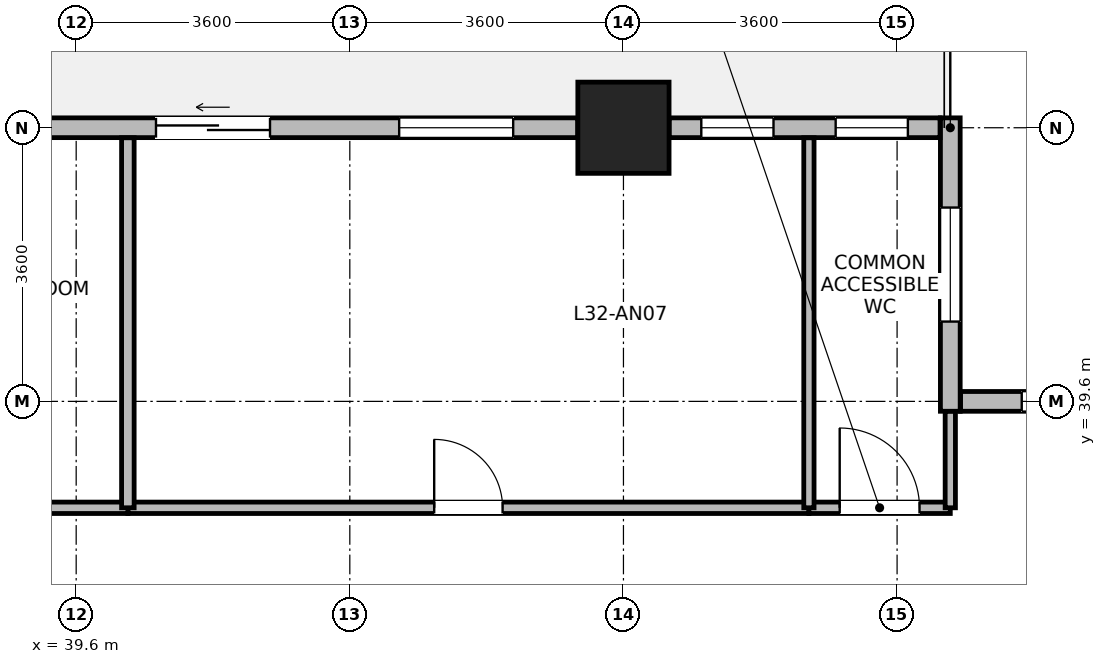
"""IFC4 building model, lengths in metres.
Left out: names, types, materials, properties, quantities, classifications, styles, units other than length and angle.
Written with IfcOpenShell. Run it as: python <this file> out.ifc"""

import sys

from ifc_helpers import new_model, si_unit, direction, frame, frame_2d, origin, origin_2d, place, context, subcontext, project, spatial, rectangle, extrude, source, transform, mapped, element, fill, save


model = new_model("IFC4")
c1 = context("Model", 3, precision=1e-05, world=origin(), true_north=direction((0.0, 1.0)))
c2 = subcontext(c1, "Body", "Model", "MODEL_VIEW")
j1 = project(units=[si_unit("LENGTHUNIT", "METRE"), si_unit("PLANEANGLEUNIT", "RADIAN")], contexts=[c1])
p1 = place(None, origin())
s1 = spatial("IfcSite", under=j1, at=p1, CompositionType="ELEMENT")
p2 = place(p1, origin())
s2 = spatial("IfcBuilding", under=s1, at=p2, CompositionType="ELEMENT")
p3 = place(p2, frame((0.0, 0.0, 126.7)))
s3 = spatial("IfcBuildingStorey", under=s2, at=p3, CompositionType="ELEMENT", Elevation=126.7)
m1 = source(origin(), c2, "Body", "SweptSolid", [
    extrude(rectangle(XDim=1.2, YDim=1.2, at=origin_2d()), origin(), (0.0, 0.0, 1.0), 3.7),
])
p4 = place(p3, frame((46.8, 43.2, 0.0), z_axis=(0.0, 0.0, 1.0), x_axis=(1.0, 0.0, 0.0)))
e1 = element("IfcColumn", 1, at=p4, inside=s3, PredefinedType="COLUMN", context=c2, shape_type="MappedRepresentation", body=[
    mapped(m1, transform((0.0, 0.0, 0.0), x_axis=(1.0, 0.0, 0.0), y_axis=(0.0, 1.0, 0.0), z_axis=(0.0, 0.0, 1.0), scale=1.0)),
])
p5 = place(p3, frame((51.235, 39.6, 0.0), z_axis=(0.0, 0.0, 1.0), x_axis=(1.0, 0.0, 0.0)))
e2 = element("IfcWall", 2, at=p5, inside=s3, PredefinedType="STANDARD", context=c2, shape_type="SweptSolid", body=[
    extrude(rectangle(XDim=9.33, YDim=0.26, at=frame_2d((4.665, 0.0))), origin(), (0.0, 0.0, 1.0), 3.32),
])
p6 = place(p5, frame((0.805, 0.0, 0.85)))
e3 = element("IfcOpeningElement", 3, at=p6, cuts=e2, PredefinedType="OPENING", context=c2, shape_type="SweptSolid", body=[
    extrude(rectangle(XDim=1.5, YDim=1.85, at=frame_2d((0.75, 0.925))), frame((0.0, 0.14, 0.0), z_axis=(0.0, -1.0, 0.0), x_axis=(1.0, 0.0, 0.0)), (0.0, 0.0, 1.0), 0.28),
])
p7 = place(p5, frame((3.915, 0.0, 0.85)))
e4 = element("IfcOpeningElement", 4, at=p7, cuts=e2, PredefinedType="OPENING", context=c2, shape_type="SweptSolid", body=[
    extrude(rectangle(XDim=1.5, YDim=1.85, at=frame_2d((0.75, 0.925))), frame((0.0, 0.14, 0.0), z_axis=(0.0, -1.0, 0.0), x_axis=(1.0, 0.0, 0.0)), (0.0, 0.0, 1.0), 0.28),
])
p8 = place(p5, frame((7.025, 0.0, 0.85)))
e5 = element("IfcOpeningElement", 5, at=p8, cuts=e2, PredefinedType="OPENING", context=c2, shape_type="SweptSolid", body=[
    extrude(rectangle(XDim=1.5, YDim=1.85, at=frame_2d((0.75, 0.925))), frame((0.0, 0.14, 0.0), z_axis=(0.0, -1.0, 0.0), x_axis=(1.0, 0.0, 0.0)), (0.0, 0.0, 1.0), 0.28),
])
p9 = place(p3, frame((51.1, 43.33, 0.0), z_axis=(0.0, 0.0, 1.0), x_axis=(0.0, -1.0, 0.0)))
e6 = element("IfcWall", 6, at=p9, inside=s3, PredefinedType="STANDARD", context=c2, shape_type="SweptSolid", body=[
    extrude(rectangle(XDim=3.86, YDim=0.26, at=frame_2d((1.93, 0.0))), origin(), (0.0, 0.0, 1.0), 3.32),
])
p10 = place(p9, frame((1.18, 0.0, 0.85)))
e7 = element("IfcOpeningElement", 7, at=p10, cuts=e6, PredefinedType="OPENING", context=c2, shape_type="SweptSolid", body=[
    extrude(rectangle(XDim=1.5, YDim=1.85, at=frame_2d((0.75, 0.925))), frame((0.0, 0.14, 0.0), z_axis=(0.0, -1.0, 0.0), x_axis=(1.0, 0.0, 0.0)), (0.0, 0.0, 1.0), 0.28),
])
p11 = place(p3, frame((47.401, 43.2, 0.0), z_axis=(0.0, 0.0, 1.0), x_axis=(1.0, 0.0, 0.0)))
e8 = element("IfcWall", 8, at=p11, inside=s3, PredefinedType="STANDARD", context=c2, shape_type="SweptSolid", body=[
    extrude(rectangle(XDim=3.564, YDim=0.26, at=frame_2d((1.782, 0.0))), origin(), (0.0, 0.0, 1.0), 3.32),
])
p12 = place(p11, frame((0.423, 0.0, 0.85)))
e9 = element("IfcOpeningElement", 9, at=p12, cuts=e8, PredefinedType="OPENING", context=c2, shape_type="SweptSolid", body=[
    extrude(rectangle(XDim=0.95, YDim=1.75, at=frame_2d((0.475, 0.875))), frame((0.0, 0.14, 0.0), z_axis=(0.0, -1.0, 0.0), x_axis=(1.0, 0.0, 0.0)), (0.0, 0.0, 1.0), 0.28),
])
p13 = place(p11, frame((2.191, 0.0, 0.85)))
e10 = element("IfcOpeningElement", 10, at=p13, cuts=e8, PredefinedType="OPENING", context=c2, shape_type="SweptSolid", body=[
    extrude(rectangle(XDim=0.95, YDim=1.75, at=frame_2d((0.475, 0.875))), frame((0.0, 0.14, 0.0), z_axis=(0.0, -1.0, 0.0), x_axis=(1.0, 0.0, 0.0)), (0.0, 0.0, 1.0), 0.28),
])
p14 = place(p3, frame((36.601, 43.2, 0.0), z_axis=(0.0, 0.0, 1.0), x_axis=(1.0, 0.0, 0.0)))
e11 = element("IfcWall", 11, at=p14, inside=s3, PredefinedType="STANDARD", context=c2, shape_type="SweptSolid", body=[
    extrude(rectangle(XDim=9.598, YDim=0.26, at=frame_2d((4.799, 0.0))), origin(), (0.0, 0.0, 1.0), 2.87),
])
p15 = place(p14, frame((4.049, 0.0, 0.0)))
e12 = element("IfcOpeningElement", 12, at=p15, cuts=e11, PredefinedType="OPENING", context=c2, shape_type="SweptSolid", body=[
    extrude(rectangle(XDim=1.5, YDim=2.15, at=frame_2d((0.75, 1.075))), frame((0.0, 0.14, 0.0), z_axis=(0.0, -1.0, 0.0), x_axis=(1.0, 0.0, 0.0)), (0.0, 0.0, 1.0), 0.28),
])
p16 = place(p14, frame((0.85, 0.0, 0.85)))
e13 = element("IfcOpeningElement", 13, at=p16, cuts=e11, PredefinedType="OPENING", context=c2, shape_type="SweptSolid", body=[
    extrude(rectangle(XDim=1.5, YDim=1.85, at=frame_2d((0.75, 0.925))), frame((0.0, 0.14, 0.0), z_axis=(0.0, -1.0, 0.0), x_axis=(1.0, 0.0, 0.0)), (0.0, 0.0, 1.0), 0.28),
])
p17 = place(p14, frame((7.248, 0.0, 0.85)))
e14 = element("IfcOpeningElement", 14, at=p17, cuts=e11, PredefinedType="OPENING", context=c2, shape_type="SweptSolid", body=[
    extrude(rectangle(XDim=1.5, YDim=1.85, at=frame_2d((0.75, 0.925))), frame((0.0, 0.14, 0.0), z_axis=(0.0, -1.0, 0.0), x_axis=(1.0, 0.0, 0.0)), (0.0, 0.0, 1.0), 0.28),
])
p18 = place(p3, frame((40.28, 38.2, 0.0), z_axis=(0.0, 0.0, 1.0), x_axis=(1.0, 0.0, 0.0)))
e15 = element("IfcWall", 15, at=p18, inside=s3, PredefinedType="PARTITIONING", context=c2, shape_type="SweptSolid", body=[
    extrude(rectangle(XDim=8.96, YDim=0.15, at=frame_2d((4.48, 0.0))), origin(), (0.0, 0.0, 1.0), 3.32),
])
p19 = place(p18, frame((4.03, 0.0, 0.0)))
e16 = element("IfcOpeningElement", 16, at=p19, cuts=e15, PredefinedType="OPENING", context=c2, shape_type="SweptSolid", body=[
    extrude(rectangle(XDim=0.9, YDim=2.08, at=frame_2d((0.45, 1.04))), frame((0.0, 0.085, 0.0), z_axis=(0.0, -1.0, 0.0), x_axis=(1.0, 0.0, 0.0)), (0.0, 0.0, 1.0), 0.17),
])
p20 = place(p3, frame((35.42, 38.2, 0.0), z_axis=(0.0, 0.0, 1.0), x_axis=(1.0, 0.0, 0.0)))
e17 = element("IfcWall", 17, at=p20, inside=s3, PredefinedType="PARTITIONING", context=c2, shape_type="SweptSolid", body=[
    extrude(rectangle(XDim=4.86, YDim=0.15, at=frame_2d((2.43, 0.0))), origin(), (0.0, 0.0, 1.0), 3.32),
])
p21 = place(p20, frame((1.955, 0.0, 0.0)))
e18 = element("IfcOpeningElement", 18, at=p21, cuts=e17, PredefinedType="OPENING", context=c2, shape_type="SweptSolid", body=[
    extrude(rectangle(XDim=0.95, YDim=2.1, at=frame_2d((0.475, 1.05))), frame((0.0, 0.085, 0.0), z_axis=(0.0, -1.0, 0.0), x_axis=(1.0, 0.0, 0.0)), (0.0, 0.0, 1.0), 0.17),
])
p22 = place(p3, frame((49.24, 38.2, 0.0), z_axis=(0.0, 0.0, 1.0), x_axis=(1.0, 0.0, 0.0)))
e19 = element("IfcWall", 19, at=p22, inside=s3, PredefinedType="PARTITIONING", context=c2, shape_type="SweptSolid", body=[
    extrude(rectangle(XDim=1.86, YDim=0.15, at=frame_2d((0.93, 0.0))), origin(), (0.0, 0.0, 1.0), 3.32),
])
p23 = place(p22, frame((0.405, 0.0, 0.0)))
e20 = element("IfcOpeningElement", 20, at=p23, cuts=e19, PredefinedType="OPENING", context=c2, shape_type="SweptSolid", body=[
    extrude(rectangle(XDim=1.05, YDim=2.12, at=frame_2d((0.525, 1.06))), frame((0.0, 0.085, 0.0), z_axis=(0.0, -1.0, 0.0), x_axis=(1.0, 0.0, 0.0)), (0.0, 0.0, 1.0), 0.17),
])
p24 = place(p3, frame((40.28, 38.2, 0.0), z_axis=(0.0, 0.0, 1.0), x_axis=(0.0, 1.0, 0.0)))
e21 = element("IfcWall", 21, at=p24, inside=s3, PredefinedType="PARTITIONING", context=c2, shape_type="SweptSolid", body=[
    extrude(rectangle(XDim=4.868, YDim=0.165, at=frame_2d((2.434, 0.0))), origin(), (0.0, 0.0, 1.0), 3.32),
])
p25 = place(p3, frame((49.24, 38.2, 0.0), z_axis=(0.0, 0.0, 1.0), x_axis=(0.0, 1.0, 0.0)))
e22 = element("IfcWall", 22, at=p25, inside=s3, PredefinedType="PARTITIONING", context=c2, shape_type="SweptSolid", body=[
    extrude(rectangle(XDim=4.868, YDim=0.135, at=frame_2d((2.434, 0.0))), origin(), (0.0, 0.0, 1.0), 3.32),
])
p26 = place(p3, frame((51.1, 38.2, 0.0), z_axis=(0.0, 0.0, 1.0), x_axis=(0.0, 1.0, 0.0)))
e23 = element("IfcWall", 23, at=p26, inside=s3, PredefinedType="PARTITIONING", context=c2, shape_type="SweptSolid", body=[
    extrude(rectangle(XDim=1.268, YDim=0.135, at=frame_2d((0.634, 0.0))), origin(), (0.0, 0.0, 1.0), 3.32),
])
p27 = place(p6, origin())
e24 = element("IfcWindow", 24, at=p27, inside=s3, PartitioningType="SINGLE_PANEL", PredefinedType="WINDOW", context=c2, shape_type="SweptSolid", body=[
    extrude(rectangle(XDim=1.5, YDim=1.85, at=frame_2d((0.75, 0.925))), frame((0.0, 0.03, 0.0), z_axis=(0.0, -1.0, 0.0), x_axis=(1.0, 0.0, 0.0)), (0.0, 0.0, 1.0), 0.06),
])
fill(e3, e24)
p28 = place(p10, origin())
e25 = element("IfcWindow", 25, at=p28, inside=s3, PartitioningType="SINGLE_PANEL", PredefinedType="WINDOW", context=c2, shape_type="SweptSolid", body=[
    extrude(rectangle(XDim=1.5, YDim=1.85, at=frame_2d((0.75, 0.925))), frame((0.0, 0.03, 0.0), z_axis=(0.0, -1.0, 0.0), x_axis=(1.0, 0.0, 0.0)), (0.0, 0.0, 1.0), 0.06),
])
fill(e7, e25)
p29 = place(p12, origin())
e26 = element("IfcWindow", 26, at=p29, inside=s3, PartitioningType="SINGLE_PANEL", PredefinedType="WINDOW", context=c2, shape_type="SweptSolid", body=[
    extrude(rectangle(XDim=0.95, YDim=1.75, at=frame_2d((0.475, 0.875))), frame((0.0, 0.03, 0.0), z_axis=(0.0, -1.0, 0.0), x_axis=(1.0, 0.0, 0.0)), (0.0, 0.0, 1.0), 0.06),
])
fill(e9, e26)
p30 = place(p13, origin())
e27 = element("IfcWindow", 27, at=p30, inside=s3, PartitioningType="SINGLE_PANEL", PredefinedType="WINDOW", context=c2, shape_type="SweptSolid", body=[
    extrude(rectangle(XDim=0.95, YDim=1.75, at=frame_2d((0.475, 0.875))), frame((0.0, 0.03, 0.0), z_axis=(0.0, -1.0, 0.0), x_axis=(1.0, 0.0, 0.0)), (0.0, 0.0, 1.0), 0.06),
])
fill(e10, e27)
p31 = place(p15, origin())
e28 = element("IfcDoor", 28, at=p31, inside=s3, OperationType="SLIDING_TO_LEFT", PredefinedType="DOOR", context=c2, shape_type="SweptSolid", body=[
    extrude(rectangle(XDim=1.5, YDim=2.15, at=frame_2d((0.75, 1.075))), frame((0.0, 0.025, 0.0), z_axis=(0.0, -1.0, 0.0), x_axis=(1.0, 0.0, 0.0)), (0.0, 0.0, 1.0), 0.05),
])
fill(e12, e28)
p32 = place(p17, origin())
e29 = element("IfcWindow", 29, at=p32, inside=s3, PartitioningType="SINGLE_PANEL", PredefinedType="WINDOW", context=c2, shape_type="SweptSolid", body=[
    extrude(rectangle(XDim=1.5, YDim=1.85, at=frame_2d((0.75, 0.925))), frame((0.0, 0.03, 0.0), z_axis=(0.0, -1.0, 0.0), x_axis=(1.0, 0.0, 0.0)), (0.0, 0.0, 1.0), 0.06),
])
fill(e14, e29)
p33 = place(p19, origin())
e30 = element("IfcDoor", 30, at=p33, inside=s3, OperationType="SINGLE_SWING_LEFT", PredefinedType="DOOR", context=c2, shape_type="SweptSolid", body=[
    extrude(rectangle(XDim=0.9, YDim=2.08, at=frame_2d((0.45, 1.04))), frame((0.0, 0.025, 0.0), z_axis=(0.0, -1.0, 0.0), x_axis=(1.0, 0.0, 0.0)), (0.0, 0.0, 1.0), 0.05),
])
fill(e16, e30)
p34 = place(p23, origin())
e31 = element("IfcDoor", 31, at=p34, inside=s3, OperationType="SINGLE_SWING_LEFT", PredefinedType="DOOR", context=c2, shape_type="SweptSolid", body=[
    extrude(rectangle(XDim=1.05, YDim=2.12, at=frame_2d((0.525, 1.06))), frame((0.0, 0.025, 0.0), z_axis=(0.0, -1.0, 0.0), x_axis=(1.0, 0.0, 0.0)), (0.0, 0.0, 1.0), 0.05),
])
fill(e20, e31)
save(model, sys.argv[1])
